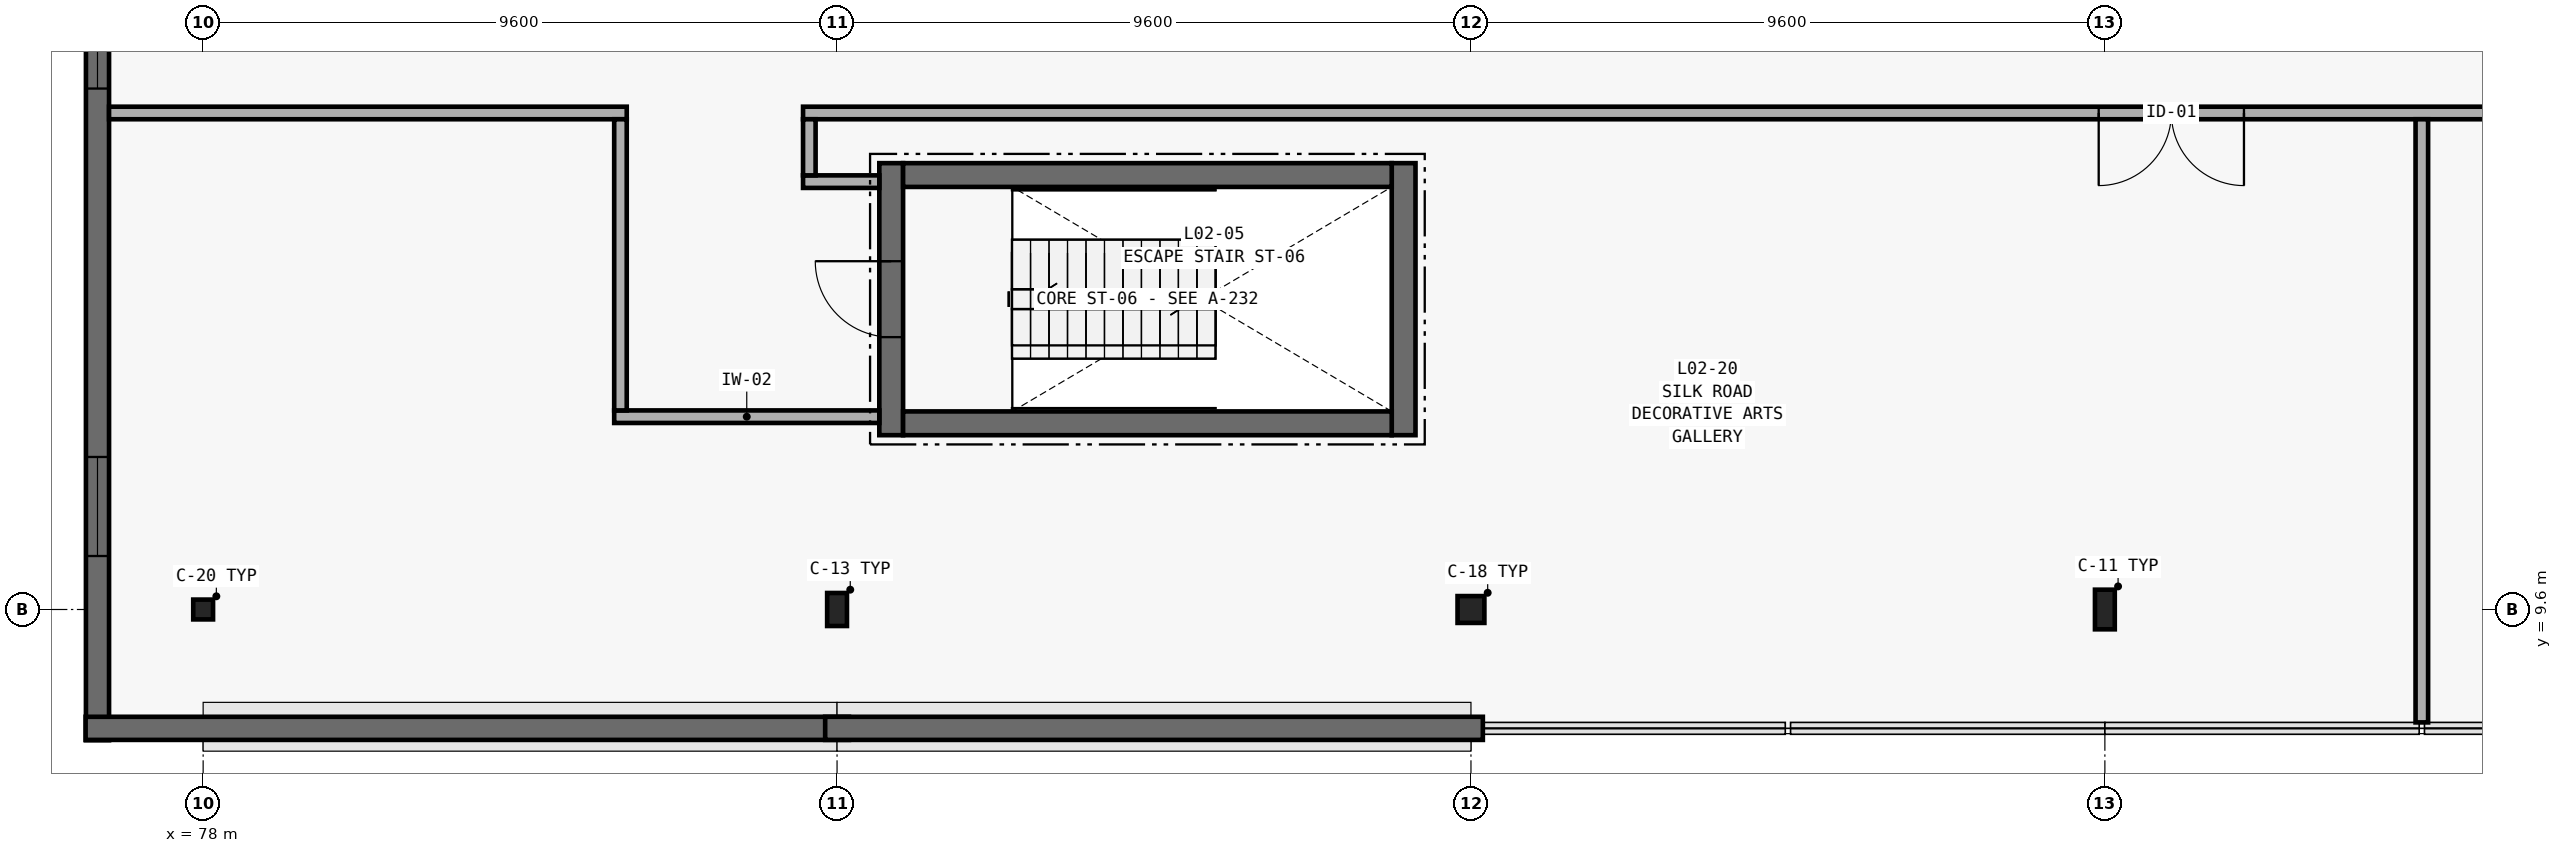
"""IFC4 building model, lengths in metres.
Left out: names, types, materials, properties, quantities, classifications, styles, units other than length and angle.
Written with IfcOpenShell. Run it as: python <this file> out.ifc"""

import sys

from ifc_helpers import new_model, si_unit, direction, frame, frame_2d, origin, origin_2d, place, context, subcontext, project, spatial, rectangle, hollow_rectangle, hollow_circle, i_section, extrude, element, fill, save


model = new_model("IFC4")
c1 = context("Model", 3, precision=1e-05, world=origin(), true_north=direction((0.0, 1.0)))
c2 = subcontext(c1, "Body", "Model", "MODEL_VIEW")
j1 = project(units=[si_unit("LENGTHUNIT", "METRE"), si_unit("PLANEANGLEUNIT", "RADIAN")], contexts=[c1])
p1 = place(None, origin())
s1 = spatial("IfcSite", under=j1, at=p1, CompositionType="ELEMENT")
p2 = place(p1, origin())
s2 = spatial("IfcBuilding", under=s1, at=p2, CompositionType="ELEMENT")
p3 = place(p2, frame((0.0, 0.0, 9.0)))
s3 = spatial("IfcBuildingStorey", under=s2, at=p3, CompositionType="ELEMENT", Elevation=9.0)
p4 = place(p3, frame((78.0, 9.6, 0.0), z_axis=(0.0, 0.0, 1.0), x_axis=(1.0, 0.0, 0.0)))
e1 = element("IfcColumn", 1, at=p4, inside=s3, PredefinedType="COLUMN", context=c2, shape_type="SweptSolid", body=[
    extrude(hollow_rectangle(XDim=0.3, YDim=0.3, WallThickness=0.016, at=origin_2d()), origin(), (0.0, 0.0, 1.0), 8.1),
])
p5 = place(p3, frame((87.6, 9.6, 0.0), z_axis=(0.0, 0.0, 1.0), x_axis=(1.0, 0.0, 0.0)))
e2 = element("IfcColumn", 2, at=p5, inside=s3, PredefinedType="COLUMN", context=c2, shape_type="SweptSolid", body=[
    extrude(i_section(OverallWidth=0.3, OverallDepth=0.5, WebThickness=0.014, FlangeThickness=0.028, FilletRadius=0.027, at=origin_2d()), origin(), (0.0, 0.0, 1.0), 8.1),
])
p6 = place(p3, frame((97.2, 9.6, 0.0), z_axis=(0.0, 0.0, 1.0), x_axis=(1.0, 0.0, 0.0)))
e3 = element("IfcColumn", 3, at=p6, inside=s3, PredefinedType="COLUMN", context=c2, shape_type="SweptSolid", body=[
    extrude(hollow_circle(Radius=0.203, WallThickness=0.02, at=origin_2d()), origin(), (0.0, 0.0, 1.0), 8.1),
])
p7 = place(p3, frame((106.8, 9.6, 0.0), z_axis=(0.0, 0.0, 1.0), x_axis=(1.0, 0.0, 0.0)))
e4 = element("IfcColumn", 4, at=p7, inside=s3, PredefinedType="COLUMN", context=c2, shape_type="SweptSolid", body=[
    extrude(i_section(OverallWidth=0.3, OverallDepth=0.6, WebThickness=0.015, FlangeThickness=0.03, FilletRadius=0.027, at=origin_2d()), origin(), (0.0, 0.0, 1.0), 8.1),
])
p8 = place(p3, frame((76.4, 21.78, 0.0), z_axis=(0.0, 0.0, 1.0), x_axis=(0.0, -1.0, 0.0)))
e5 = element("IfcWall", 5, at=p8, inside=s3, PredefinedType="STANDARD", context=c2, shape_type="SweptSolid", body=[
    extrude(rectangle(XDim=14.16, YDim=0.35, at=frame_2d((7.08, 0.0))), origin(), (0.0, 0.0, 1.0), 7.8),
])
p9 = place(p8, frame((2.79, 0.0, 0.8)))
e6 = element("IfcOpeningElement", 6, at=p9, cuts=e5, PredefinedType="OPENING", context=c2, shape_type="SweptSolid", body=[
    extrude(rectangle(XDim=1.5, YDim=2.7, at=frame_2d((0.75, 1.35))), frame((0.0, 0.19, 0.0), z_axis=(0.0, -1.0, 0.0), x_axis=(1.0, 0.0, 0.0)), (0.0, 0.0, 1.0), 0.38),
])
p10 = place(p8, frame((9.87, 0.0, 0.8)))
e7 = element("IfcOpeningElement", 7, at=p10, cuts=e5, PredefinedType="OPENING", context=c2, shape_type="SweptSolid", body=[
    extrude(rectangle(XDim=1.5, YDim=2.7, at=frame_2d((0.75, 1.35))), frame((0.0, 0.19, 0.0), z_axis=(0.0, -1.0, 0.0), x_axis=(1.0, 0.0, 0.0)), (0.0, 0.0, 1.0), 0.38),
])
p11 = place(p3, frame((76.22, 7.8, 0.0), z_axis=(0.0, 0.0, 1.0), x_axis=(1.0, 0.0, 0.0)))
e8 = element("IfcWall", 8, at=p11, inside=s3, PredefinedType="STANDARD", context=c2, shape_type="SweptSolid", body=[
    extrude(rectangle(XDim=11.56, YDim=0.35, at=frame_2d((5.78, 0.0))), origin(), (0.0, 0.0, 1.0), 7.8),
])
p12 = place(p3, frame((87.42, 7.8, 0.0), z_axis=(0.0, 0.0, 1.0), x_axis=(1.0, 0.0, 0.0)))
e9 = element("IfcWall", 9, at=p12, inside=s3, PredefinedType="STANDARD", context=c2, shape_type="SweptSolid", body=[
    extrude(rectangle(XDim=9.96, YDim=0.35, at=frame_2d((4.98, 0.0))), origin(), (0.0, 0.0, 1.0), 7.8),
])
p13 = place(p3, frame((88.42, 12.24, 0.0), z_axis=(0.0, 0.0, 1.0), x_axis=(0.0, 1.0, 0.0)))
e10 = element("IfcWall", 10, at=p13, inside=s3, PredefinedType="SHEAR", context=c2, shape_type="SweptSolid", body=[
    extrude(rectangle(XDim=4.12, YDim=0.36, at=frame_2d((2.06, 0.0))), origin(), (0.0, 0.0, 1.0), 7.82),
])
p14 = place(p13, frame((1.485, 0.0, 0.0)))
e11 = element("IfcOpeningElement", 11, at=p14, cuts=e10, PredefinedType="OPENING", context=c2, shape_type="SweptSolid", body=[
    extrude(rectangle(XDim=1.15, YDim=2.15, at=frame_2d((0.575, 1.075))), frame((0.0, 0.195, 0.0), z_axis=(0.0, -1.0, 0.0), x_axis=(1.0, 0.0, 0.0)), (0.0, 0.0, 1.0), 0.39),
])
p15 = place(p3, frame((96.18, 12.24, 0.0), z_axis=(0.0, 0.0, 1.0), x_axis=(0.0, 1.0, 0.0)))
e12 = element("IfcWall", 12, at=p15, inside=s3, PredefinedType="SHEAR", context=c2, shape_type="SweptSolid", body=[
    extrude(rectangle(XDim=4.12, YDim=0.36, at=frame_2d((2.06, 0.0))), origin(), (0.0, 0.0, 1.0), 7.82),
])
for number, where, z_axis, x_axis in (
    (13, (88.6, 16.18, 0.0), (0.0, 0.0, 1.0), (1.0, 0.0, 0.0)),
    (14, (88.6, 12.42, 0.0), (0.0, 0.0, 1.0), (1.0, 0.0, 0.0)),
):
    element("IfcWall", number, at=place(p3, frame(where, z_axis=z_axis, x_axis=x_axis)), inside=s3, PredefinedType="SHEAR", context=c2, shape_type="SweptSolid", body=[
        extrude(rectangle(XDim=7.4, YDim=0.36, at=frame_2d((3.7, 0.0))), origin(), (0.0, 0.0, 1.0), 7.82),
    ])
p16 = place(p3, frame((84.225, 12.52, 0.0), z_axis=(0.0, 0.0, 1.0), x_axis=(1.0, 0.0, 0.0)))
e15 = element("IfcWall", 15, at=p16, inside=s3, PredefinedType="PARTITIONING", context=c2, shape_type="SweptSolid", body=[
    extrude(rectangle(XDim=4.015, YDim=0.19, at=frame_2d((2.007, 0.0))), origin(), (0.0, 0.0, 1.0), 6.7),
])
p17 = place(p3, frame((87.085, 16.08, 0.0), z_axis=(0.0, 0.0, 1.0), x_axis=(1.0, 0.0, 0.0)))
e16 = element("IfcWall", 16, at=p17, inside=s3, PredefinedType="PARTITIONING", context=c2, shape_type="SweptSolid", body=[
    extrude(rectangle(XDim=1.155, YDim=0.19, at=frame_2d((0.578, 0.0))), origin(), (0.0, 0.0, 1.0), 6.7),
])
p18 = place(p3, frame((76.575, 17.12, 0.0), z_axis=(0.0, 0.0, 1.0), x_axis=(1.0, 0.0, 0.0)))
e17 = element("IfcWall", 17, at=p18, inside=s3, PredefinedType="PARTITIONING", context=c2, shape_type="SweptSolid", body=[
    extrude(rectangle(XDim=7.84, YDim=0.19, at=frame_2d((3.92, 0.0))), origin(), (0.0, 0.0, 1.0), 6.7),
])
p19 = place(p3, frame((87.085, 17.12, 0.0), z_axis=(0.0, 0.0, 1.0), x_axis=(1.0, 0.0, 0.0)))
e18 = element("IfcWall", 18, at=p19, inside=s3, PredefinedType="PARTITIONING", context=c2, shape_type="SweptSolid", body=[
    extrude(rectangle(XDim=54.53, YDim=0.19, at=frame_2d((27.265, 0.0))), origin(), (0.0, 0.0, 1.0), 6.7),
])
p20 = place(p19, frame((19.621, 0.0, 0.0)))
e19 = element("IfcOpeningElement", 19, at=p20, cuts=e18, PredefinedType="OPENING", context=c2, shape_type="SweptSolid", body=[
    extrude(rectangle(XDim=2.2, YDim=2.45, at=frame_2d((1.1, 1.225))), frame((0.0, 0.11, 0.0), z_axis=(0.0, -1.0, 0.0), x_axis=(1.0, 0.0, 0.0)), (0.0, 0.0, 1.0), 0.22),
])
p21 = place(p19, frame((26.165, 0.0, 0.0)))
e20 = element("IfcOpeningElement", 20, at=p21, cuts=e18, PredefinedType="OPENING", context=c2, shape_type="SweptSolid", body=[
    extrude(rectangle(XDim=2.2, YDim=2.45, at=frame_2d((1.1, 1.225))), frame((0.0, 0.11, 0.0), z_axis=(0.0, -1.0, 0.0), x_axis=(1.0, 0.0, 0.0)), (0.0, 0.0, 1.0), 0.22),
])
p22 = place(p3, frame((84.32, 12.615, 0.0), z_axis=(0.0, 0.0, 1.0), x_axis=(0.0, 1.0, 0.0)))
e21 = element("IfcWall", 21, at=p22, inside=s3, PredefinedType="PARTITIONING", context=c2, shape_type="SweptSolid", body=[
    extrude(rectangle(XDim=4.41, YDim=0.19, at=frame_2d((2.205, 0.0))), origin(), (0.0, 0.0, 1.0), 6.7),
])
p23 = place(p3, frame((87.18, 16.175, 0.0), z_axis=(0.0, 0.0, 1.0), x_axis=(0.0, 1.0, 0.0)))
e22 = element("IfcWall", 22, at=p23, inside=s3, PredefinedType="PARTITIONING", context=c2, shape_type="SweptSolid", body=[
    extrude(rectangle(XDim=0.85, YDim=0.19, at=frame_2d((0.425, 0.0))), origin(), (0.0, 0.0, 1.0), 6.7),
])
p24 = place(p3, frame((111.6, 7.89, 0.0), z_axis=(0.0, 0.0, 1.0), x_axis=(0.0, 1.0, 0.0)))
e23 = element("IfcWall", 23, at=p24, inside=s3, PredefinedType="PARTITIONING", context=c2, shape_type="SweptSolid", body=[
    extrude(rectangle(XDim=9.135, YDim=0.19, at=frame_2d((4.567, 0.0))), origin(), (0.0, 0.0, 1.0), 6.7),
])
p25 = place(p9, origin())
e24 = element("IfcWindow", 24, at=p25, inside=s3, PartitioningType="SINGLE_PANEL", PredefinedType="WINDOW", context=c2, shape_type="SweptSolid", body=[
    extrude(rectangle(XDim=1.5, YDim=2.7, at=frame_2d((0.75, 1.35))), frame((0.0, 0.03, 0.0), z_axis=(0.0, -1.0, 0.0), x_axis=(1.0, 0.0, 0.0)), (0.0, 0.0, 1.0), 0.06),
])
fill(e6, e24)
p26 = place(p10, origin())
e25 = element("IfcWindow", 25, at=p26, inside=s3, PartitioningType="SINGLE_PANEL", PredefinedType="WINDOW", context=c2, shape_type="SweptSolid", body=[
    extrude(rectangle(XDim=1.5, YDim=2.7, at=frame_2d((0.75, 1.35))), frame((0.0, 0.03, 0.0), z_axis=(0.0, -1.0, 0.0), x_axis=(1.0, 0.0, 0.0)), (0.0, 0.0, 1.0), 0.06),
])
fill(e7, e25)
p27 = place(p14, origin())
e26 = element("IfcDoor", 26, at=p27, inside=s3, OperationType="SINGLE_SWING_RIGHT", PredefinedType="DOOR", context=c2, shape_type="SweptSolid", body=[
    extrude(rectangle(XDim=1.15, YDim=2.15, at=frame_2d((0.575, 1.075))), frame((0.0, 0.025, 0.0), z_axis=(0.0, -1.0, 0.0), x_axis=(1.0, 0.0, 0.0)), (0.0, 0.0, 1.0), 0.05),
])
fill(e11, e26)
p28 = place(p20, frame((2.2, 0.0, 0.0), z_axis=(0.0, 0.0, 1.0), x_axis=(-1.0, 0.0, 0.0)))
e27 = element("IfcDoor", 27, at=p28, inside=s3, OperationType="DOUBLE_DOOR_SINGLE_SWING", PredefinedType="DOOR", context=c2, shape_type="SweptSolid", body=[
    extrude(rectangle(XDim=2.2, YDim=2.45, at=frame_2d((1.1, 1.225))), frame((0.0, 0.025, 0.0), z_axis=(0.0, -1.0, 0.0), x_axis=(1.0, 0.0, 0.0)), (0.0, 0.0, 1.0), 0.05),
])
fill(e19, e27)
save(model, sys.argv[1])
